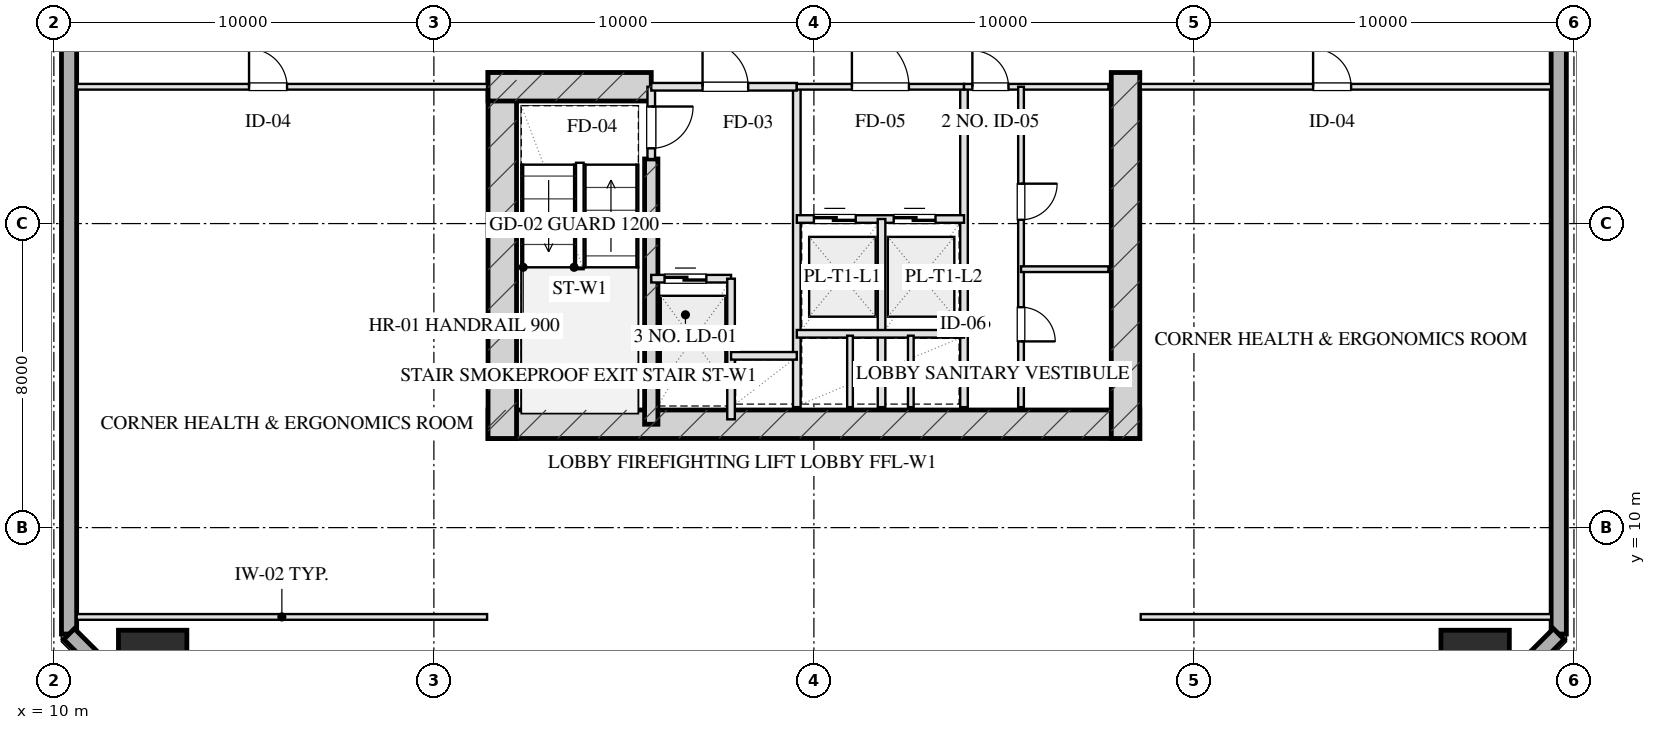
"""IFC4 building model, lengths in metres.
Left out: names, types, materials, properties, quantities, classifications, styles, units other than length and angle.
Written with IfcOpenShell. Run it as: python <this file> out.ifc"""

import sys

from ifc_helpers import new_model, si_unit, direction, frame, frame_2d, origin, origin_2d, place, context, subcontext, project, spatial, rectangle, hollow_rectangle, extrude, element, fill, save


model = new_model("IFC4")
c1 = context("Model", 3, precision=1e-05, world=origin(), true_north=direction((0.0, 1.0)))
c2 = subcontext(c1, "Body", "Model", "MODEL_VIEW")
j1 = project(units=[si_unit("LENGTHUNIT", "METRE"), si_unit("PLANEANGLEUNIT", "RADIAN")], contexts=[c1])
p1 = place(None, origin())
s1 = spatial("IfcSite", under=j1, at=p1, CompositionType="ELEMENT")
p2 = place(p1, origin())
s2 = spatial("IfcBuilding", under=s1, at=p2, CompositionType="ELEMENT")
p3 = place(p2, frame((0.0, 0.0, 88.55)))
s3 = spatial("IfcBuildingStorey", under=s2, at=p3, CompositionType="ELEMENT", Elevation=88.55)
p4 = place(p3, frame((21.425, 12.72, 0.0), z_axis=(0.0, 0.0, 1.0), x_axis=(1.0, 0.0, 0.0)))
e1 = element("IfcWall", 1, at=p4, inside=s3, PredefinedType="SHEAR", context=c2, shape_type="SweptSolid", body=[
    extrude(rectangle(XDim=17.15, YDim=0.75, at=frame_2d((8.575, 0.0))), origin(), (0.0, 0.0, 1.0), 3.45),
])
for number, where, z_axis, x_axis in (
    (2, (21.8, 21.975, 0.0), (0.0, 0.0, 1.0), (0.0, -1.0, 0.0)),
    (3, (38.2, 21.975, 0.0), (0.0, 0.0, 1.0), (0.0, -1.0, 0.0)),
):
    element("IfcWall", number, at=place(p3, frame(where, z_axis=z_axis, x_axis=x_axis)), inside=s3, PredefinedType="SHEAR", context=c2, shape_type="SweptSolid", body=[
        extrude(rectangle(XDim=9.63, YDim=0.75, at=frame_2d((4.815, 0.0))), origin(), (0.0, 0.0, 1.0), 3.45),
    ])
p5 = place(p3, frame((25.72, 19.7, 0.0), z_axis=(0.0, 0.0, 1.0), x_axis=(0.0, -1.0, 0.0)))
e4 = element("IfcWall", 4, at=p5, inside=s3, PredefinedType="SHEAR", context=c2, shape_type="SweptSolid", body=[
    extrude(rectangle(XDim=6.98, YDim=0.35, at=frame_2d((3.49, 0.0))), origin(), (0.0, 0.0, 1.0), 3.45),
])
p6 = place(p3, frame((21.425, 21.6, 0.0), z_axis=(0.0, 0.0, 1.0), x_axis=(1.0, 0.0, 0.0)))
e5 = element("IfcWall", 5, at=p6, inside=s3, PredefinedType="SHEAR", context=c2, shape_type="SweptSolid", body=[
    extrude(rectangle(XDim=4.295, YDim=0.75, at=frame_2d((2.147, 0.0))), origin(), (0.0, 0.0, 1.0), 3.45),
])
for number, where, z_axis, x_axis in (
    (6, (12.6, 6.4, 0.0), (0.0, 0.0, 1.0), (1.0, 0.0, 0.0)),
    (7, (47.4, 6.4, 0.0), (0.0, 0.0, 1.0), (1.0, 0.0, 0.0)),
):
    element("IfcColumn", number, at=place(p3, frame(where, z_axis=z_axis, x_axis=x_axis)), inside=s3, PredefinedType="COLUMN", context=c2, shape_type="SweptSolid", body=[
        extrude(hollow_rectangle(XDim=1.8, YDim=1.8, WallThickness=0.06, at=origin_2d()), origin(), (0.0, 0.0, 1.0), 3.451),
    ])
p7 = place(p3, frame((10.4, 7.2, 0.0), z_axis=(0.0, 0.0, 1.0), x_axis=(0.0, 1.0, 0.0)))
e8 = element("IfcWall", 8, at=p7, inside=s3, PredefinedType="SOLIDWALL", context=c2, shape_type="SweptSolid", body=[
    extrude(rectangle(XDim=53.6, YDim=0.4, at=frame_2d((26.8, 0.0))), origin(), (0.0, 0.0, 1.0), 2.55),
])
p8 = place(p7, frame((21.85, 0.0, 0.0)))
e9 = element("IfcOpeningElement", 9, at=p8, cuts=e8, PredefinedType="OPENING", context=c2, shape_type="SweptSolid", body=[
    extrude(rectangle(XDim=1.1, YDim=2.15, at=frame_2d((0.55, 1.075))), frame((0.0, 0.21, 0.0), z_axis=(0.0, -1.0, 0.0), x_axis=(1.0, 0.0, 0.0)), (0.0, 0.0, 1.0), 0.42),
])
p9 = place(p3, frame((49.6, 60.8, 0.0), z_axis=(0.0, 0.0, 1.0), x_axis=(0.0, -1.0, 0.0)))
e10 = element("IfcWall", 10, at=p9, inside=s3, PredefinedType="SOLIDWALL", context=c2, shape_type="SweptSolid", body=[
    extrude(rectangle(XDim=53.6, YDim=0.4, at=frame_2d((26.8, 0.0))), origin(), (0.0, 0.0, 1.0), 2.55),
])
p10 = place(p9, frame((23.0, 0.0, 0.75)))
e11 = element("IfcOpeningElement", 11, at=p10, cuts=e10, PredefinedType="OPENING", context=c2, shape_type="SweptSolid", body=[
    extrude(rectangle(XDim=2.4, YDim=1.4, at=frame_2d((1.2, 0.7))), frame((0.0, 0.21, 0.0), z_axis=(0.0, -1.0, 0.0), x_axis=(1.0, 0.0, 0.0)), (0.0, 0.0, 1.0), 0.42),
])
p11 = place(p9, frame((30.65, 0.0, 0.0)))
e12 = element("IfcOpeningElement", 12, at=p11, cuts=e10, PredefinedType="OPENING", context=c2, shape_type="SweptSolid", body=[
    extrude(rectangle(XDim=1.1, YDim=2.15, at=frame_2d((0.55, 1.075))), frame((0.0, 0.21, 0.0), z_axis=(0.0, -1.0, 0.0), x_axis=(1.0, 0.0, 0.0)), (0.0, 0.0, 1.0), 0.42),
])
for number, where, z_axis, x_axis in (
    (13, (49.6, 7.2, 0.0), (0.0, 0.0, 1.0), (-0.707, -0.707, 0.0)),
    (14, (13.4, 4.2, 0.0), (0.0, 0.0, 1.0), (-0.707, 0.707, 0.0)),
):
    element("IfcWall", number, at=place(p3, frame(where, z_axis=z_axis, x_axis=x_axis)), inside=s3, PredefinedType="SOLIDWALL", context=c2, shape_type="SweptSolid", body=[
        extrude(rectangle(XDim=4.243, YDim=0.4, at=frame_2d((2.121, 0.0))), origin(), (0.0, 0.0, 1.0), 2.55),
    ])
p12 = place(p3, frame((25.72, 21.6, 0.0), z_axis=(0.0, 0.0, 1.0), x_axis=(0.0, -1.0, 0.0)))
e15 = element("IfcWall", 15, at=p12, inside=s3, PredefinedType="PARTITIONING", context=c2, shape_type="SweptSolid", body=[
    extrude(rectangle(XDim=1.9, YDim=0.2, at=frame_2d((0.95, 0.0))), origin(), (0.0, 0.0, 1.0), 3.155),
])
p13 = place(p12, frame((0.52, 0.0, 0.0)))
e16 = element("IfcOpeningElement", 16, at=p13, cuts=e15, PredefinedType="OPENING", context=c2, shape_type="SweptSolid", body=[
    extrude(rectangle(XDim=1.1, YDim=2.05, at=frame_2d((0.55, 1.025))), frame((0.0, 0.11, 0.0), z_axis=(0.0, -1.0, 0.0), x_axis=(1.0, 0.0, 0.0)), (0.0, 0.0, 1.0), 0.22),
])
p14 = place(p3, frame((29.55, 21.6, 0.0), z_axis=(0.0, 0.0, 1.0), x_axis=(0.0, -1.0, 0.0)))
e17 = element("IfcWall", 17, at=p14, inside=s3, PredefinedType="PARTITIONING", context=c2, shape_type="SweptSolid", body=[
    extrude(rectangle(XDim=8.43, YDim=0.2, at=frame_2d((4.215, 0.0))), origin(), (0.0, 0.0, 1.0), 3.155),
])
p15 = place(p3, frame((25.72, 21.6, 0.0), z_axis=(0.0, 0.0, 1.0), x_axis=(1.0, 0.0, 0.0)))
e18 = element("IfcWall", 18, at=p15, inside=s3, PredefinedType="PARTITIONING", context=c2, shape_type="SweptSolid", body=[
    extrude(rectangle(XDim=3.83, YDim=0.2, at=frame_2d((1.915, 0.0))), origin(), (0.0, 0.0, 1.0), 3.155),
])
p16 = place(p15, frame((1.35, 0.0, 0.0)))
e19 = element("IfcOpeningElement", 19, at=p16, cuts=e18, PredefinedType="OPENING", context=c2, shape_type="SweptSolid", body=[
    extrude(rectangle(XDim=1.2, YDim=2.05, at=frame_2d((0.6, 1.025))), frame((0.0, 0.11, 0.0), z_axis=(0.0, -1.0, 0.0), x_axis=(1.0, 0.0, 0.0)), (0.0, 0.0, 1.0), 0.22),
])
p17 = place(p3, frame((25.72, 16.55, 0.0), z_axis=(0.0, 0.0, 1.0), x_axis=(1.0, 0.0, 0.0)))
e20 = element("IfcWall", 20, at=p17, inside=s3, PredefinedType="PARTITIONING", context=c2, shape_type="SweptSolid", body=[
    extrude(rectangle(XDim=2.1, YDim=0.2, at=frame_2d((1.05, 0.0))), origin(), (0.0, 0.0, 1.0), 3.155),
])
p18 = place(p17, frame((0.35, 0.0, 0.0)))
e21 = element("IfcOpeningElement", 21, at=p18, cuts=e20, PredefinedType="OPENING", context=c2, shape_type="SweptSolid", body=[
    extrude(rectangle(XDim=1.1, YDim=2.05, at=frame_2d((0.55, 1.025))), frame((0.0, 0.11, 0.0), z_axis=(0.0, -1.0, 0.0), x_axis=(1.0, 0.0, 0.0)), (0.0, 0.0, 1.0), 0.22),
])
p19 = place(p3, frame((27.82, 16.55, 0.0), z_axis=(0.0, 0.0, 1.0), x_axis=(0.0, -1.0, 0.0)))
e22 = element("IfcWall", 22, at=p19, inside=s3, PredefinedType="PARTITIONING", context=c2, shape_type="SweptSolid", body=[
    extrude(rectangle(XDim=3.7, YDim=0.2, at=frame_2d((1.85, 0.0))), origin(), (0.0, 0.0, 1.0), 3.155),
])
p20 = place(p3, frame((27.82, 14.52, 0.0), z_axis=(0.0, 0.0, 1.0), x_axis=(1.0, 0.0, 0.0)))
e23 = element("IfcWall", 23, at=p20, inside=s3, PredefinedType="PARTITIONING", context=c2, shape_type="SweptSolid", body=[
    extrude(rectangle(XDim=1.73, YDim=0.2, at=frame_2d((0.865, 0.0))), origin(), (0.0, 0.0, 1.0), 3.155),
])
p21 = place(p3, frame((33.95, 21.6, 0.0), z_axis=(0.0, 0.0, 1.0), x_axis=(0.0, -1.0, 0.0)))
e24 = element("IfcWall", 24, at=p21, inside=s3, PredefinedType="PARTITIONING", context=c2, shape_type="SweptSolid", body=[
    extrude(rectangle(XDim=8.43, YDim=0.2, at=frame_2d((4.215, 0.0))), origin(), (0.0, 0.0, 1.0), 3.155),
])
p22 = place(p3, frame((29.55, 21.6, 0.0), z_axis=(0.0, 0.0, 1.0), x_axis=(1.0, 0.0, 0.0)))
e25 = element("IfcWall", 25, at=p22, inside=s3, PredefinedType="PARTITIONING", context=c2, shape_type="SweptSolid", body=[
    extrude(rectangle(XDim=4.4, YDim=0.15, at=frame_2d((2.2, 0.0))), origin(), (0.0, 0.0, 1.0), 3.155),
])
p23 = place(p22, frame((1.45, 0.0, 0.0)))
e26 = element("IfcOpeningElement", 26, at=p23, cuts=e25, PredefinedType="OPENING", context=c2, shape_type="SweptSolid", body=[
    extrude(rectangle(XDim=1.5, YDim=2.05, at=frame_2d((0.75, 1.025))), frame((0.0, 0.085, 0.0), z_axis=(0.0, -1.0, 0.0), x_axis=(1.0, 0.0, 0.0)), (0.0, 0.0, 1.0), 0.17),
])
p24 = place(p3, frame((29.55, 18.12, 0.0), z_axis=(0.0, 0.0, 1.0), x_axis=(1.0, 0.0, 0.0)))
e27 = element("IfcWall", 27, at=p24, inside=s3, PredefinedType="PARTITIONING", context=c2, shape_type="SweptSolid", body=[
    extrude(rectangle(XDim=4.4, YDim=0.2, at=frame_2d((2.2, 0.0))), origin(), (0.0, 0.0, 1.0), 3.155),
])
p25 = place(p24, frame((0.45, 0.0, 0.0)))
e28 = element("IfcOpeningElement", 28, at=p25, cuts=e27, PredefinedType="OPENING", context=c2, shape_type="SweptSolid", body=[
    extrude(rectangle(XDim=1.1, YDim=2.05, at=frame_2d((0.55, 1.025))), frame((0.0, 0.11, 0.0), z_axis=(0.0, -1.0, 0.0), x_axis=(1.0, 0.0, 0.0)), (0.0, 0.0, 1.0), 0.22),
])
p26 = place(p24, frame((2.55, 0.0, 0.0)))
e29 = element("IfcOpeningElement", 29, at=p26, cuts=e27, PredefinedType="OPENING", context=c2, shape_type="SweptSolid", body=[
    extrude(rectangle(XDim=1.1, YDim=2.05, at=frame_2d((0.55, 1.025))), frame((0.0, 0.11, 0.0), z_axis=(0.0, -1.0, 0.0), x_axis=(1.0, 0.0, 0.0)), (0.0, 0.0, 1.0), 0.22),
])
p27 = place(p3, frame((31.78, 18.12, 0.0), z_axis=(0.0, 0.0, 1.0), x_axis=(0.0, -1.0, 0.0)))
e30 = element("IfcWall", 30, at=p27, inside=s3, PredefinedType="PARTITIONING", context=c2, shape_type="SweptSolid", body=[
    extrude(rectangle(XDim=4.95, YDim=0.2, at=frame_2d((2.475, 0.0))), origin(), (0.0, 0.0, 1.0), 3.155),
])
p28 = place(p3, frame((29.55, 15.1, 0.0), z_axis=(0.0, 0.0, 1.0), x_axis=(1.0, 0.0, 0.0)))
e31 = element("IfcWall", 31, at=p28, inside=s3, PredefinedType="PARTITIONING", context=c2, shape_type="SweptSolid", body=[
    extrude(rectangle(XDim=4.4, YDim=0.2, at=frame_2d((2.2, 0.0))), origin(), (0.0, 0.0, 1.0), 3.155),
])
for number, where, z_axis, x_axis in (
    (32, (30.95, 15.05, 0.0), (0.0, 0.0, 1.0), (0.0, -1.0, 0.0)),
    (33, (32.55, 15.05, 0.0), (0.0, 0.0, 1.0), (0.0, -1.0, 0.0)),
):
    element("IfcWall", number, at=place(p3, frame(where, z_axis=z_axis, x_axis=x_axis)), inside=s3, PredefinedType="PARTITIONING", context=c2, shape_type="SweptSolid", body=[
        extrude(rectangle(XDim=1.88, YDim=0.15, at=frame_2d((0.94, 0.0))), origin(), (0.0, 0.0, 1.0), 3.155),
    ])
p29 = place(p3, frame((33.95, 21.6, 0.0), z_axis=(0.0, 0.0, 1.0), x_axis=(1.0, 0.0, 0.0)))
e34 = element("IfcWall", 34, at=p29, inside=s3, PredefinedType="PARTITIONING", context=c2, shape_type="SweptSolid", body=[
    extrude(rectangle(XDim=3.8, YDim=0.15, at=frame_2d((1.9, 0.0))), origin(), (0.0, 0.0, 1.0), 3.155),
])
p30 = place(p29, frame((0.22, 0.0, 0.0)))
e35 = element("IfcOpeningElement", 35, at=p30, cuts=e34, PredefinedType="OPENING", context=c2, shape_type="SweptSolid", body=[
    extrude(rectangle(XDim=0.95, YDim=2.05, at=frame_2d((0.475, 1.025))), frame((0.0, 0.085, 0.0), z_axis=(0.0, -1.0, 0.0), x_axis=(1.0, 0.0, 0.0)), (0.0, 0.0, 1.0), 0.17),
])
p31 = place(p3, frame((35.45, 21.6, 0.0), z_axis=(0.0, 0.0, 1.0), x_axis=(0.0, -1.0, 0.0)))
e36 = element("IfcWall", 36, at=p31, inside=s3, PredefinedType="PARTITIONING", context=c2, shape_type="SweptSolid", body=[
    extrude(rectangle(XDim=8.43, YDim=0.15, at=frame_2d((4.215, 0.0))), origin(), (0.0, 0.0, 1.0), 2.745),
])
p32 = place(p31, frame((2.55, 0.0, 0.0)))
e37 = element("IfcOpeningElement", 37, at=p32, cuts=e36, PredefinedType="OPENING", context=c2, shape_type="SweptSolid", body=[
    extrude(rectangle(XDim=0.95, YDim=2.05, at=frame_2d((0.475, 1.025))), frame((0.0, 0.085, 0.0), z_axis=(0.0, -1.0, 0.0), x_axis=(1.0, 0.0, 0.0)), (0.0, 0.0, 1.0), 0.17),
])
p33 = place(p31, frame((5.8, 0.0, 0.0)))
e38 = element("IfcOpeningElement", 38, at=p33, cuts=e36, PredefinedType="OPENING", context=c2, shape_type="SweptSolid", body=[
    extrude(rectangle(XDim=0.9, YDim=2.05, at=frame_2d((0.45, 1.025))), frame((0.0, 0.085, 0.0), z_axis=(0.0, -1.0, 0.0), x_axis=(1.0, 0.0, 0.0)), (0.0, 0.0, 1.0), 0.17),
])
p34 = place(p3, frame((35.45, 16.8, 0.0), z_axis=(0.0, 0.0, 1.0), x_axis=(1.0, 0.0, 0.0)))
e39 = element("IfcWall", 39, at=p34, inside=s3, PredefinedType="PARTITIONING", context=c2, shape_type="SweptSolid", body=[
    extrude(rectangle(XDim=2.3, YDim=0.15, at=frame_2d((1.15, 0.0))), origin(), (0.0, 0.0, 1.0), 3.155),
])
p35 = place(p3, frame((10.6, 7.65, 0.0), z_axis=(0.0, 0.0, 1.0), x_axis=(1.0, 0.0, 0.0)))
e40 = element("IfcWall", 40, at=p35, inside=s3, PredefinedType="PARTITIONING", context=c2, shape_type="SweptSolid", body=[
    extrude(rectangle(XDim=10.8, YDim=0.15, at=frame_2d((5.4, 0.0))), origin(), (0.0, 0.0, 1.0), 3.155),
])
p36 = place(p3, frame((10.6, 21.6, 0.0), z_axis=(0.0, 0.0, 1.0), x_axis=(1.0, 0.0, 0.0)))
e41 = element("IfcWall", 41, at=p36, inside=s3, PredefinedType="PARTITIONING", context=c2, shape_type="SweptSolid", body=[
    extrude(rectangle(XDim=10.8, YDim=0.15, at=frame_2d((5.4, 0.0))), origin(), (0.0, 0.0, 1.0), 2.15),
])
p37 = place(p36, frame((4.536, 0.0, 0.0)))
e42 = element("IfcOpeningElement", 42, at=p37, cuts=e41, PredefinedType="OPENING", context=c2, shape_type="SweptSolid", body=[
    extrude(rectangle(XDim=1.0, YDim=2.05, at=frame_2d((0.5, 1.025))), frame((0.0, 0.085, 0.0), z_axis=(0.0, -1.0, 0.0), x_axis=(1.0, 0.0, 0.0)), (0.0, 0.0, 1.0), 0.17),
])
p38 = place(p3, frame((38.6, 7.65, 0.0), z_axis=(0.0, 0.0, 1.0), x_axis=(1.0, 0.0, 0.0)))
e43 = element("IfcWall", 43, at=p38, inside=s3, PredefinedType="PARTITIONING", context=c2, shape_type="SweptSolid", body=[
    extrude(rectangle(XDim=10.8, YDim=0.15, at=frame_2d((5.4, 0.0))), origin(), (0.0, 0.0, 1.0), 3.155),
])
p39 = place(p3, frame((38.6, 21.6, 0.0), z_axis=(0.0, 0.0, 1.0), x_axis=(1.0, 0.0, 0.0)))
e44 = element("IfcWall", 44, at=p39, inside=s3, PredefinedType="PARTITIONING", context=c2, shape_type="SweptSolid", body=[
    extrude(rectangle(XDim=10.8, YDim=0.15, at=frame_2d((5.4, 0.0))), origin(), (0.0, 0.0, 1.0), 2.15),
])
p40 = place(p39, frame((4.536, 0.0, 0.0)))
e45 = element("IfcOpeningElement", 45, at=p40, cuts=e44, PredefinedType="OPENING", context=c2, shape_type="SweptSolid", body=[
    extrude(rectangle(XDim=1.0, YDim=2.05, at=frame_2d((0.5, 1.025))), frame((0.0, 0.085, 0.0), z_axis=(0.0, -1.0, 0.0), x_axis=(1.0, 0.0, 0.0)), (0.0, 0.0, 1.0), 0.17),
])
p41 = place(p13, origin())
e46 = element("IfcDoor", 46, at=p41, inside=s3, OperationType="SINGLE_SWING_LEFT", PredefinedType="DOOR", context=c2, shape_type="SweptSolid", body=[
    extrude(rectangle(XDim=1.1, YDim=2.05, at=frame_2d((0.55, 1.025))), frame((0.0, 0.025, 0.0), z_axis=(0.0, -1.0, 0.0), x_axis=(1.0, 0.0, 0.0)), (0.0, 0.0, 1.0), 0.05),
])
fill(e16, e46)
p42 = place(p16, origin())
e47 = element("IfcDoor", 47, at=p42, inside=s3, OperationType="SINGLE_SWING_LEFT", PredefinedType="DOOR", context=c2, shape_type="SweptSolid", body=[
    extrude(rectangle(XDim=1.2, YDim=2.05, at=frame_2d((0.6, 1.025))), frame((0.0, 0.025, 0.0), z_axis=(0.0, -1.0, 0.0), x_axis=(1.0, 0.0, 0.0)), (0.0, 0.0, 1.0), 0.05),
])
fill(e19, e47)
p43 = place(p18, origin())
e48 = element("IfcDoor", 48, at=p43, inside=s3, OperationType="DOUBLE_DOOR_SLIDING", PredefinedType="DOOR", context=c2, shape_type="SweptSolid", body=[
    extrude(rectangle(XDim=1.1, YDim=2.05, at=frame_2d((0.55, 1.025))), frame((0.0, 0.025, 0.0), z_axis=(0.0, -1.0, 0.0), x_axis=(1.0, 0.0, 0.0)), (0.0, 0.0, 1.0), 0.05),
])
fill(e21, e48)
p44 = place(p23, origin())
e49 = element("IfcDoor", 49, at=p44, inside=s3, OperationType="SINGLE_SWING_LEFT", PredefinedType="DOOR", context=c2, shape_type="SweptSolid", body=[
    extrude(rectangle(XDim=1.5, YDim=2.05, at=frame_2d((0.75, 1.025))), frame((0.0, 0.025, 0.0), z_axis=(0.0, -1.0, 0.0), x_axis=(1.0, 0.0, 0.0)), (0.0, 0.0, 1.0), 0.05),
])
fill(e26, e49)
p45 = place(p25, origin())
e50 = element("IfcDoor", 50, at=p45, inside=s3, OperationType="DOUBLE_DOOR_SLIDING", PredefinedType="DOOR", context=c2, shape_type="SweptSolid", body=[
    extrude(rectangle(XDim=1.1, YDim=2.05, at=frame_2d((0.55, 1.025))), frame((0.0, 0.025, 0.0), z_axis=(0.0, -1.0, 0.0), x_axis=(1.0, 0.0, 0.0)), (0.0, 0.0, 1.0), 0.05),
])
fill(e28, e50)
p46 = place(p26, origin())
e51 = element("IfcDoor", 51, at=p46, inside=s3, OperationType="DOUBLE_DOOR_SLIDING", PredefinedType="DOOR", context=c2, shape_type="SweptSolid", body=[
    extrude(rectangle(XDim=1.1, YDim=2.05, at=frame_2d((0.55, 1.025))), frame((0.0, 0.025, 0.0), z_axis=(0.0, -1.0, 0.0), x_axis=(1.0, 0.0, 0.0)), (0.0, 0.0, 1.0), 0.05),
])
fill(e29, e51)
p47 = place(p30, origin())
e52 = element("IfcDoor", 52, at=p47, inside=s3, OperationType="SINGLE_SWING_LEFT", PredefinedType="DOOR", context=c2, shape_type="SweptSolid", body=[
    extrude(rectangle(XDim=0.95, YDim=2.05, at=frame_2d((0.475, 1.025))), frame((0.0, 0.025, 0.0), z_axis=(0.0, -1.0, 0.0), x_axis=(1.0, 0.0, 0.0)), (0.0, 0.0, 1.0), 0.05),
])
fill(e35, e52)
p48 = place(p32, origin())
e53 = element("IfcDoor", 53, at=p48, inside=s3, OperationType="SINGLE_SWING_LEFT", PredefinedType="DOOR", context=c2, shape_type="SweptSolid", body=[
    extrude(rectangle(XDim=0.95, YDim=2.05, at=frame_2d((0.475, 1.025))), frame((0.0, 0.025, 0.0), z_axis=(0.0, -1.0, 0.0), x_axis=(1.0, 0.0, 0.0)), (0.0, 0.0, 1.0), 0.05),
])
fill(e37, e53)
p49 = place(p33, origin())
e54 = element("IfcDoor", 54, at=p49, inside=s3, OperationType="SINGLE_SWING_RIGHT", PredefinedType="DOOR", context=c2, shape_type="SweptSolid", body=[
    extrude(rectangle(XDim=0.9, YDim=2.05, at=frame_2d((0.45, 1.025))), frame((0.0, 0.025, 0.0), z_axis=(0.0, -1.0, 0.0), x_axis=(1.0, 0.0, 0.0)), (0.0, 0.0, 1.0), 0.05),
])
fill(e38, e54)
p50 = place(p37, origin())
e55 = element("IfcDoor", 55, at=p50, inside=s3, OperationType="SINGLE_SWING_LEFT", PredefinedType="DOOR", context=c2, shape_type="SweptSolid", body=[
    extrude(rectangle(XDim=1.0, YDim=2.05, at=frame_2d((0.5, 1.025))), frame((0.0, 0.025, 0.0), z_axis=(0.0, -1.0, 0.0), x_axis=(1.0, 0.0, 0.0)), (0.0, 0.0, 1.0), 0.05),
])
fill(e42, e55)
p51 = place(p40, origin())
e56 = element("IfcDoor", 56, at=p51, inside=s3, OperationType="SINGLE_SWING_LEFT", PredefinedType="DOOR", context=c2, shape_type="SweptSolid", body=[
    extrude(rectangle(XDim=1.0, YDim=2.05, at=frame_2d((0.5, 1.025))), frame((0.0, 0.025, 0.0), z_axis=(0.0, -1.0, 0.0), x_axis=(1.0, 0.0, 0.0)), (0.0, 0.0, 1.0), 0.05),
])
fill(e45, e56)
save(model, sys.argv[1])
